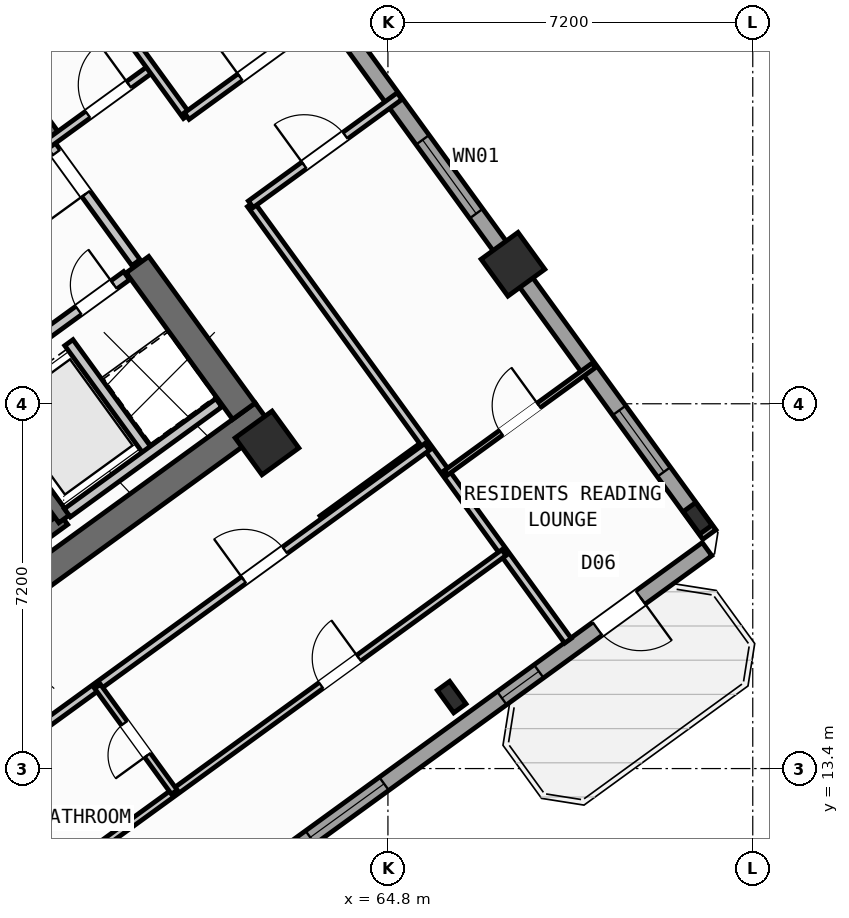
"""IFC4 building model, lengths in metres.
Left out: names, types, materials, properties, quantities, classifications, styles, units other than length and angle.
Written with IfcOpenShell. Run it as: python <this file> out.ifc"""

import sys

from ifc_helpers import new_model, si_unit, direction, frame, frame_2d, origin, origin_2d, place, context, subcontext, project, spatial, rectangle, hollow_rectangle, i_section, extrude, source, transform, mapped, element, fill, save


model = new_model("IFC4")
c1 = context("Model", 3, precision=1e-05, world=origin(), true_north=direction((0.0, 1.0)))
c2 = subcontext(c1, "Body", "Model", "MODEL_VIEW")
j1 = project(units=[si_unit("LENGTHUNIT", "METRE"), si_unit("PLANEANGLEUNIT", "RADIAN")], contexts=[c1])
p1 = place(None, origin())
s1 = spatial("IfcSite", under=j1, at=p1, CompositionType="ELEMENT")
p2 = place(p1, origin())
s2 = spatial("IfcBuilding", under=s1, at=p2, CompositionType="ELEMENT")
p3 = place(p2, frame((0.0, 0.0, 140.7)))
s3 = spatial("IfcBuildingStorey", under=s2, at=p3, CompositionType="ELEMENT", Elevation=140.7)
p4 = place(p3, frame((52.359, 13.14, 0.0), z_axis=(0.0, 0.0, 1.0), x_axis=(0.809014896919, 0.587788139183, 0.0)))
e1 = element("IfcWall", 1, at=p4, inside=s3, PredefinedType="SHEAR", context=c2, shape_type="SweptSolid", body=[
    extrude(rectangle(XDim=12.34, YDim=0.55, at=frame_2d((6.17, 0.0))), origin(), (0.0, 0.0, 1.0), 3.35),
])
p5 = place(p3, frame((61.958, 20.454, 0.0), z_axis=(0.0, 0.0, 1.0), x_axis=(-0.587802113096, 0.809004744015, 0.0)))
e2 = element("IfcWall", 2, at=p5, inside=s3, PredefinedType="SHEAR", context=c2, shape_type="SweptSolid", body=[
    extrude(rectangle(XDim=3.575, YDim=0.55, at=frame_2d((1.788, 0.0))), origin(), (0.0, 0.0, 1.0), 3.35),
])
p6 = place(p3, frame((58.064, 25.813, 0.0), z_axis=(0.0, 0.0, 1.0), x_axis=(-0.587764933797, 0.809031756236, 0.0)))
e3 = element("IfcWall", 3, at=p6, inside=s3, PredefinedType="SHEAR", context=c2, shape_type="SweptSolid", body=[
    extrude(rectangle(XDim=6.425, YDim=0.55, at=frame_2d((3.212, 0.0))), origin(), (0.0, 0.0, 1.0), 3.35),
])
m1 = source(origin(), c2, "Body", "SweptSolid", [
    extrude(i_section(OverallWidth=0.3, OverallDepth=0.55, WebThickness=0.015, FlangeThickness=0.029, at=origin_2d()), origin(), (0.0, 0.0, 1.0), 3.6),
])
p7 = place(p3, frame((66.058, 14.811, 0.0), z_axis=(0.0, 0.0, 1.0), x_axis=(0.809016994375, 0.587785252292, 0.0)))
e4 = element("IfcColumn", 4, at=p7, inside=s3, PredefinedType="COLUMN", context=c2, shape_type="MappedRepresentation", body=[
    mapped(m1, transform((0.0, 0.0, 0.0), scale=1.0)),
])
m2 = source(origin(), c2, "Body", "SweptSolid", [
    extrude(hollow_rectangle(XDim=0.9, YDim=0.9, WallThickness=0.036, at=origin_2d()), origin(), (0.0, 0.0, 1.0), 3.6),
])
p8 = place(p3, frame((62.414, 19.827, 0.0), z_axis=(0.0, 0.0, 1.0), x_axis=(0.809016994375, 0.587785252292, 0.0)))
e5 = element("IfcColumn", 5, at=p8, inside=s3, PredefinedType="COLUMN", context=c2, shape_type="MappedRepresentation", body=[
    mapped(m2, transform((0.0, 0.0, 0.0), scale=1.0)),
])
p9 = place(p3, frame((70.912, 18.338, 0.0), z_axis=(0.0, 0.0, 1.0), x_axis=(0.809016994375, 0.587785252292, 0.0)))
e6 = element("IfcColumn", 6, at=p9, inside=s3, PredefinedType="COLUMN", context=c2, shape_type="MappedRepresentation", body=[
    mapped(m1, transform((0.0, 0.0, 0.0), scale=1.0)),
])
p10 = place(p3, frame((67.268, 23.354, 0.0), z_axis=(0.0, 0.0, 1.0), x_axis=(0.809016994375, 0.587785252292, 0.0)))
e7 = element("IfcColumn", 7, at=p10, inside=s3, PredefinedType="COLUMN", context=c2, shape_type="MappedRepresentation", body=[
    mapped(m2, transform((0.0, 0.0, 0.0), scale=1.0)),
])
p11 = place(p3, frame((43.938, 25.192, 0.0), z_axis=(0.0, 0.0, 1.0), x_axis=(0.809016324578, 0.587786174187, 0.0)))
e8 = element("IfcWall", 8, at=p11, inside=s3, PredefinedType="STANDARD", context=c2, shape_type="SweptSolid", body=[
    extrude(rectangle(XDim=17.587, YDim=0.32, at=frame_2d((8.794, 0.0))), origin(), (0.0, 0.0, 1.0), 3.35),
])
p12 = place(p11, frame((14.914, 0.0, 0.0)))
e9 = element("IfcOpeningElement", 9, at=p12, cuts=e8, PredefinedType="OPENING", context=c2, shape_type="SweptSolid", body=[
    extrude(rectangle(XDim=1.05, YDim=2.15, at=frame_2d((0.525, 1.075))), frame((0.0, 0.17, 0.0), z_axis=(0.0, -1.0, 0.0), x_axis=(1.0, 0.0, 0.0)), (0.0, 0.0, 1.0), 0.34),
])
p13 = place(p11, frame((2.144, 0.0, 0.8)))
e10 = element("IfcOpeningElement", 10, at=p13, cuts=e8, PredefinedType="OPENING", context=c2, shape_type="SweptSolid", body=[
    extrude(rectangle(XDim=2.1, YDim=1.55, at=frame_2d((1.05, 0.775))), frame((0.0, 0.17, 0.0), z_axis=(0.0, -1.0, 0.0), x_axis=(1.0, 0.0, 0.0)), (0.0, 0.0, 1.0), 0.34),
])
p14 = place(p11, frame((7.344, 0.0, 0.8)))
e11 = element("IfcOpeningElement", 11, at=p14, cuts=e8, PredefinedType="OPENING", context=c2, shape_type="SweptSolid", body=[
    extrude(rectangle(XDim=2.1, YDim=1.55, at=frame_2d((1.05, 0.775))), frame((0.0, 0.17, 0.0), z_axis=(0.0, -1.0, 0.0), x_axis=(1.0, 0.0, 0.0)), (0.0, 0.0, 1.0), 0.34),
])
p15 = place(p3, frame((58.455, 35.484, 0.0), z_axis=(0.0, 0.0, 1.0), x_axis=(0.587783625747, -0.809018176127, 0.0)))
e12 = element("IfcWall", 12, at=p15, inside=s3, PredefinedType="STANDARD", context=c2, shape_type="SweptSolid", body=[
    extrude(rectangle(XDim=21.587, YDim=0.32, at=frame_2d((10.794, 0.0))), origin(), (0.0, 0.0, 1.0), 2.775),
])
p16 = place(p15, frame((2.994, 0.0, 0.8)))
e13 = element("IfcOpeningElement", 13, at=p16, cuts=e12, PredefinedType="OPENING", context=c2, shape_type="SweptSolid", body=[
    extrude(rectangle(XDim=2.1, YDim=1.55, at=frame_2d((1.05, 0.775))), frame((0.0, 0.17, 0.0), z_axis=(0.0, -1.0, 0.0), x_axis=(1.0, 0.0, 0.0)), (0.0, 0.0, 1.0), 0.34),
])
p17 = place(p15, frame((11.959, 0.0, 0.85)))
e14 = element("IfcOpeningElement", 14, at=p17, cuts=e12, PredefinedType="OPENING", context=c2, shape_type="SweptSolid", body=[
    extrude(rectangle(XDim=1.8, YDim=1.5, at=frame_2d((0.9, 0.75))), frame((0.0, 0.17, 0.0), z_axis=(0.0, -1.0, 0.0), x_axis=(1.0, 0.0, 0.0)), (0.0, 0.0, 1.0), 0.34),
])
p18 = place(p15, frame((18.56, 0.0, 0.85)))
e15 = element("IfcOpeningElement", 15, at=p18, cuts=e12, PredefinedType="OPENING", context=c2, shape_type="SweptSolid", body=[
    extrude(rectangle(XDim=1.5, YDim=1.5, at=frame_2d((0.75, 0.75))), frame((0.0, 0.17, 0.0), z_axis=(0.0, -1.0, 0.0), x_axis=(1.0, 0.0, 0.0)), (0.0, 0.0, 1.0), 0.34),
])
p19 = place(p3, frame((71.098, 17.731, 0.0), z_axis=(0.0, 0.0, 1.0), x_axis=(-0.809021120468, -0.587779573171, 0.0)))
e16 = element("IfcWall", 16, at=p19, inside=s3, PredefinedType="STANDARD", context=c2, shape_type="SweptSolid", body=[
    extrude(rectangle(XDim=17.588, YDim=0.32, at=frame_2d((8.794, 0.0))), origin(), (0.0, 0.0, 1.0), 3.35),
])
p20 = place(p19, frame((1.624, 0.0, 0.0)))
e17 = element("IfcOpeningElement", 17, at=p20, cuts=e16, PredefinedType="OPENING", context=c2, shape_type="SweptSolid", body=[
    extrude(rectangle(XDim=1.05, YDim=2.15, at=frame_2d((0.525, 1.075))), frame((0.0, 0.17, 0.0), z_axis=(0.0, -1.0, 0.0), x_axis=(1.0, 0.0, 0.0)), (0.0, 0.0, 1.0), 0.34),
])
p21 = place(p19, frame((4.104, 0.0, 1.0)))
e18 = element("IfcOpeningElement", 18, at=p21, cuts=e16, PredefinedType="OPENING", context=c2, shape_type="SweptSolid", body=[
    extrude(rectangle(XDim=0.9, YDim=1.25, at=frame_2d((0.45, 0.625))), frame((0.0, 0.17, 0.0), z_axis=(0.0, -1.0, 0.0), x_axis=(1.0, 0.0, 0.0)), (0.0, 0.0, 1.0), 0.34),
])
p22 = place(p19, frame((7.879, 0.0, 0.85)))
e19 = element("IfcOpeningElement", 19, at=p22, cuts=e16, PredefinedType="OPENING", context=c2, shape_type="SweptSolid", body=[
    extrude(rectangle(XDim=1.8, YDim=1.5, at=frame_2d((0.9, 0.75))), frame((0.0, 0.17, 0.0), z_axis=(0.0, -1.0, 0.0), x_axis=(1.0, 0.0, 0.0)), (0.0, 0.0, 1.0), 0.34),
])
p23 = place(p19, frame((12.849, 0.0, 0.85)))
e20 = element("IfcOpeningElement", 20, at=p23, cuts=e16, PredefinedType="OPENING", context=c2, shape_type="SweptSolid", body=[
    extrude(rectangle(XDim=1.8, YDim=1.5, at=frame_2d((0.9, 0.75))), frame((0.0, 0.17, 0.0), z_axis=(0.0, -1.0, 0.0), x_axis=(1.0, 0.0, 0.0)), (0.0, 0.0, 1.0), 0.34),
])
p24 = place(p3, frame((52.472, 14.013, 0.0), z_axis=(0.0, 0.0, 1.0), x_axis=(0.809028366311, 0.587769599847, 0.0)))
e21 = element("IfcWall", 21, at=p24, inside=s3, PredefinedType="SHEAR", context=c2, shape_type="SweptSolid", body=[
    extrude(rectangle(XDim=7.33, YDim=0.26, at=frame_2d((3.665, 0.0))), origin(), (0.0, 0.0, 1.0), 3.35),
])
p25 = place(p3, frame((58.41, 18.327, 0.0), z_axis=(0.0, 0.0, 1.0), x_axis=(-0.58776738483, 0.809029975545, 0.0)))
e22 = element("IfcWall", 22, at=p25, inside=s3, PredefinedType="SHEAR", context=c2, shape_type="SweptSolid", body=[
    extrude(rectangle(XDim=3.16, YDim=0.26, at=frame_2d((1.58, 0.0))), origin(), (0.0, 0.0, 1.0), 3.35),
])
p26 = place(p3, frame((56.553, 20.884, 0.0), z_axis=(0.0, 0.0, 1.0), x_axis=(0.809023564264, 0.58777620951, 0.0)))
e23 = element("IfcWall", 23, at=p26, inside=s3, PredefinedType="STANDARD", context=c2, shape_type="SweptSolid", body=[
    extrude(rectangle(XDim=3.818, YDim=0.2, at=frame_2d((1.909, 0.0))), origin(), (0.0, 0.0, 1.0), 3.34),
])
p27 = place(p26, frame((0.57, 0.0, 0.0)))
e24 = element("IfcOpeningElement", 24, at=p27, cuts=e23, PredefinedType="OPENING", context=c2, shape_type="SweptSolid", body=[
    extrude(rectangle(XDim=1.1, YDim=2.15, at=frame_2d((0.55, 1.075))), frame((0.0, 0.11, 0.0), z_axis=(0.0, -1.0, 0.0), x_axis=(1.0, 0.0, 0.0)), (0.0, 0.0, 1.0), 0.22),
])
p28 = place(p26, frame((2.65, 0.0, 0.0)))
e25 = element("IfcOpeningElement", 25, at=p28, cuts=e23, PredefinedType="OPENING", context=c2, shape_type="SweptSolid", body=[
    extrude(rectangle(XDim=0.86, YDim=2.05, at=frame_2d((0.43, 1.025))), frame((0.0, 0.11, 0.0), z_axis=(0.0, -1.0, 0.0), x_axis=(1.0, 0.0, 0.0)), (0.0, 0.0, 1.0), 0.22),
])
p29 = place(p3, frame((60.067, 19.655, 0.0), z_axis=(0.0, 0.0, 1.0), x_axis=(-0.587800520745, 0.809005900975, 0.0)))
e26 = element("IfcWall", 26, at=p29, inside=s3, PredefinedType="STANDARD", context=c2, shape_type="SweptSolid", body=[
    extrude(rectangle(XDim=2.66, YDim=0.2, at=frame_2d((1.33, 0.0))), origin(), (0.0, 0.0, 1.0), 3.34),
])
p30 = place(p3, frame((58.472, 18.447, 0.0), z_axis=(0.0, 0.0, 1.0), x_axis=(0.809018631237, 0.587782999339, 0.0)))
e27 = element("IfcWall", 27, at=p30, inside=s3, PredefinedType="STANDARD", context=c2, shape_type="SweptSolid", body=[
    extrude(rectangle(XDim=3.698, YDim=0.2, at=frame_2d((1.849, 0.0))), origin(), (0.0, 0.0, 1.0), 3.34),
])
p31 = place(p3, frame((59.827, 23.386, 0.0), z_axis=(0.0, 0.0, 1.0), x_axis=(-0.587803840107, 0.809003489211, 0.0)))
e28 = element("IfcWall", 28, at=p31, inside=s3, PredefinedType="STANDARD", context=c2, shape_type="SweptSolid", body=[
    extrude(rectangle(XDim=2.96, YDim=0.2, at=frame_2d((1.48, 0.0))), origin(), (0.0, 0.0, 1.0), 3.34),
])
p32 = place(p31, frame((1.68, 0.0, 0.0)))
e29 = element("IfcOpeningElement", 29, at=p32, cuts=e28, PredefinedType="OPENING", context=c2, shape_type="SweptSolid", body=[
    extrude(rectangle(XDim=1.0, YDim=2.1, at=frame_2d((0.5, 1.05))), frame((0.0, 0.11, 0.0), z_axis=(0.0, -1.0, 0.0), x_axis=(1.0, 0.0, 0.0)), (0.0, 0.0, 1.0), 0.22),
])
p33 = place(p3, frame((63.507, 18.322, 0.0), z_axis=(0.0, 0.0, 1.0), x_axis=(0.809034604122, 0.587761013791, 0.0)))
e30 = element("IfcWall", 30, at=p33, inside=s3, PredefinedType="PARTITIONING", context=c2, shape_type="SweptSolid", body=[
    extrude(rectangle(XDim=2.51, YDim=0.16, at=frame_2d((1.255, 0.0))), origin(), (0.0, 0.0, 1.0), 3.34),
])
p34 = place(p3, frame((58.111, 25.749, 0.0), z_axis=(0.0, 0.0, 1.0), x_axis=(0.809000999347, 0.58780726693, 0.0)))
e31 = element("IfcWall", 31, at=p34, inside=s3, PredefinedType="PARTITIONING", context=c2, shape_type="SweptSolid", body=[
    extrude(rectangle(XDim=2.51, YDim=0.16, at=frame_2d((1.255, 0.0))), origin(), (0.0, 0.0, 1.0), 2.775),
])
p35 = place(p34, frame((0.95, 0.0, 0.0)))
e32 = element("IfcOpeningElement", 32, at=p35, cuts=e31, PredefinedType="OPENING", context=c2, shape_type="SweptSolid", body=[
    extrude(rectangle(XDim=1.0, YDim=2.1, at=frame_2d((0.5, 1.05))), frame((0.0, 0.09, 0.0), z_axis=(0.0, -1.0, 0.0), x_axis=(1.0, 0.0, 0.0)), (0.0, 0.0, 1.0), 0.18),
])
p36 = place(p3, frame((68.353, 15.922, 0.0), z_axis=(0.0, 0.0, 1.0), x_axis=(-0.587783168305, 0.809018508476, 0.0)))
e33 = element("IfcWall", 33, at=p36, inside=s3, PredefinedType="PARTITIONING", context=c2, shape_type="SweptSolid", body=[
    extrude(rectangle(XDim=10.65, YDim=0.16, at=frame_2d((5.325, 0.0))), origin(), (0.0, 0.0, 1.0), 3.34),
])
p37 = place(p3, frame((60.829, 26.278, 0.0), z_axis=(0.0, 0.0, 1.0), x_axis=(-0.587781800813, 0.80901950201, 0.0)))
e34 = element("IfcWall", 34, at=p37, inside=s3, PredefinedType="PARTITIONING", context=c2, shape_type="SweptSolid", body=[
    extrude(rectangle(XDim=8.9, YDim=0.16, at=frame_2d((4.45, 0.0))), origin(), (0.0, 0.0, 1.0), 3.34),
])
p38 = place(p3, frame((62.093, 24.538, 0.0), z_axis=(0.0, 0.0, 1.0), x_axis=(0.809035546126, 0.58775971715, 0.0)))
e35 = element("IfcWall", 35, at=p38, inside=s3, PredefinedType="PARTITIONING", context=c2, shape_type="SweptSolid", body=[
    extrude(rectangle(XDim=3.63, YDim=0.16, at=frame_2d((1.815, 0.0))), origin(), (0.0, 0.0, 1.0), 3.34),
])
p39 = place(p38, frame((1.305, 0.0, 0.0)))
e36 = element("IfcOpeningElement", 36, at=p39, cuts=e35, PredefinedType="OPENING", context=c2, shape_type="SweptSolid", body=[
    extrude(rectangle(XDim=1.0, YDim=2.1, at=frame_2d((0.5, 1.05))), frame((0.0, 0.09, 0.0), z_axis=(0.0, -1.0, 0.0), x_axis=(1.0, 0.0, 0.0)), (0.0, 0.0, 1.0), 0.18),
])
p40 = place(p3, frame((60.829, 26.278, 0.0), z_axis=(0.0, 0.0, 1.0), x_axis=(0.809003564202, 0.587803736896, 0.0)))
e37 = element("IfcWall", 37, at=p40, inside=s3, PredefinedType="PARTITIONING", context=c2, shape_type="SweptSolid", body=[
    extrude(rectangle(XDim=3.63, YDim=0.16, at=frame_2d((1.815, 0.0))), origin(), (0.0, 0.0, 1.0), 3.34),
])
p41 = place(p40, frame((1.305, 0.0, 0.0)))
e38 = element("IfcOpeningElement", 38, at=p41, cuts=e37, PredefinedType="OPENING", context=c2, shape_type="SweptSolid", body=[
    extrude(rectangle(XDim=1.0, YDim=2.1, at=frame_2d((0.5, 1.05))), frame((0.0, 0.09, 0.0), z_axis=(0.0, -1.0, 0.0), x_axis=(1.0, 0.0, 0.0)), (0.0, 0.0, 1.0), 0.18),
])
p42 = place(p3, frame((65.944, 19.238, 0.0), z_axis=(0.0, 0.0, 1.0), x_axis=(0.809013833588, 0.587789602718, 0.0)))
e39 = element("IfcWall", 39, at=p42, inside=s3, PredefinedType="PARTITIONING", context=c2, shape_type="SweptSolid", body=[
    extrude(rectangle(XDim=3.61, YDim=0.11, at=frame_2d((1.805, 0.0))), origin(), (0.0, 0.0, 1.0), 3.34),
])
p43 = place(p42, frame((1.345, 0.0, 0.0)))
e40 = element("IfcOpeningElement", 40, at=p43, cuts=e39, PredefinedType="OPENING", context=c2, shape_type="SweptSolid", body=[
    extrude(rectangle(XDim=0.92, YDim=2.08, at=frame_2d((0.46, 1.04))), frame((0.0, 0.065, 0.0), z_axis=(0.0, -1.0, 0.0), x_axis=(1.0, 0.0, 0.0)), (0.0, 0.0, 1.0), 0.13),
])
p44 = place(p3, frame((53.705, 11.126, 0.0), z_axis=(0.0, 0.0, 1.0), x_axis=(0.809014504436, 0.587788679384, 0.0)))
e41 = element("IfcWall", 41, at=p44, inside=s3, PredefinedType="PARTITIONING", context=c2, shape_type="SweptSolid", body=[
    extrude(rectangle(XDim=14.67, YDim=0.16, at=frame_2d((7.335, 0.0))), origin(), (0.0, 0.0, 1.0), 3.34),
])
p45 = place(p44, frame((10.2, 0.0, 0.0)))
e42 = element("IfcOpeningElement", 42, at=p45, cuts=e41, PredefinedType="OPENING", context=c2, shape_type="SweptSolid", body=[
    extrude(rectangle(XDim=1.0, YDim=2.1, at=frame_2d((0.5, 1.05))), frame((0.0, 0.09, 0.0), z_axis=(0.0, -1.0, 0.0), x_axis=(1.0, 0.0, 0.0)), (0.0, 0.0, 1.0), 0.18),
])
p46 = place(p3, frame((56.249, 9.785, 0.0), z_axis=(0.0, 0.0, 1.0), x_axis=(0.809011747655, 0.587792473715, 0.0)))
e43 = element("IfcWall", 43, at=p46, inside=s3, PredefinedType="PLUMBINGWALL", context=c2, shape_type="SweptSolid", body=[
    extrude(rectangle(XDim=13.4, YDim=0.14, at=frame_2d((6.7, 0.0))), origin(), (0.0, 0.0, 1.0), 3.34),
])
p47 = place(p46, frame((8.94, 0.0, 0.0)))
e44 = element("IfcOpeningElement", 44, at=p47, cuts=e43, PredefinedType="OPENING", context=c2, shape_type="SweptSolid", body=[
    extrude(rectangle(XDim=0.92, YDim=2.08, at=frame_2d((0.46, 1.04))), frame((0.0, 0.08, 0.0), z_axis=(0.0, -1.0, 0.0), x_axis=(1.0, 0.0, 0.0)), (0.0, 0.0, 1.0), 0.16),
])
p48 = place(p3, frame((60.585, 12.936, 0.0), z_axis=(0.0, 0.0, 1.0), x_axis=(-0.587772116736, 0.809026537752, 0.0)))
e45 = element("IfcWall", 45, at=p48, inside=s3, PredefinedType="PLUMBINGWALL", context=c2, shape_type="SweptSolid", body=[
    extrude(rectangle(XDim=2.58, YDim=0.14, at=frame_2d((1.29, 0.0))), origin(), (0.0, 0.0, 1.0), 3.34),
])
p49 = place(p48, frame((0.9, 0.0, 0.0)))
e46 = element("IfcOpeningElement", 46, at=p49, cuts=e45, PredefinedType="OPENING", context=c2, shape_type="SweptSolid", body=[
    extrude(rectangle(XDim=0.78, YDim=2.05, at=frame_2d((0.39, 1.025))), frame((0.0, 0.08, 0.0), z_axis=(0.0, -1.0, 0.0), x_axis=(1.0, 0.0, 0.0)), (0.0, 0.0, 1.0), 0.16),
])
m3 = source(origin(), c2, "Body", "SweptSolid", [
    extrude(rectangle(XDim=1.05, YDim=2.15, at=frame_2d((0.525, 1.075))), frame((0.0, 0.025, 0.0), z_axis=(0.0, -1.0, 0.0), x_axis=(1.0, 0.0, 0.0)), (0.0, 0.0, 1.0), 0.05),
])
p50 = place(p20, origin())
e47 = element("IfcDoor", 47, at=p50, inside=s3, OperationType="SINGLE_SWING_LEFT", PredefinedType="DOOR", context=c2, shape_type="MappedRepresentation", body=[
    mapped(m3, transform((0.0, 0.0, 0.0), scale=1.0)),
])
fill(e17, e47)
m4 = source(origin(), c2, "Body", "SweptSolid", [
    extrude(rectangle(XDim=1.8, YDim=1.5, at=frame_2d((0.9, 0.75))), frame((0.0, 0.03, 0.0), z_axis=(0.0, -1.0, 0.0), x_axis=(1.0, 0.0, 0.0)), (0.0, 0.0, 1.0), 0.06),
])
p51 = place(p17, origin())
e48 = element("IfcWindow", 48, at=p51, inside=s3, PartitioningType="SINGLE_PANEL", PredefinedType="WINDOW", context=c2, shape_type="MappedRepresentation", body=[
    mapped(m4, transform((0.0, 0.0, 0.0), scale=1.0)),
])
fill(e14, e48)
m5 = source(origin(), c2, "Body", "SweptSolid", [
    extrude(rectangle(XDim=1.5, YDim=1.5, at=frame_2d((0.75, 0.75))), frame((0.0, 0.03, 0.0), z_axis=(0.0, -1.0, 0.0), x_axis=(1.0, 0.0, 0.0)), (0.0, 0.0, 1.0), 0.06),
])
p52 = place(p18, origin())
e49 = element("IfcWindow", 49, at=p52, inside=s3, PartitioningType="SINGLE_PANEL", PredefinedType="WINDOW", context=c2, shape_type="MappedRepresentation", body=[
    mapped(m5, transform((0.0, 0.0, 0.0), scale=1.0)),
])
fill(e15, e49)
m6 = source(origin(), c2, "Body", "SweptSolid", [
    extrude(rectangle(XDim=0.9, YDim=1.25, at=frame_2d((0.45, 0.625))), frame((0.0, 0.03, 0.0), z_axis=(0.0, -1.0, 0.0), x_axis=(1.0, 0.0, 0.0)), (0.0, 0.0, 1.0), 0.06),
])
p53 = place(p21, origin())
e50 = element("IfcWindow", 50, at=p53, inside=s3, PartitioningType="SINGLE_PANEL", PredefinedType="WINDOW", context=c2, shape_type="MappedRepresentation", body=[
    mapped(m6, transform((0.0, 0.0, 0.0), scale=1.0)),
])
fill(e18, e50)
p54 = place(p22, origin())
e51 = element("IfcWindow", 51, at=p54, inside=s3, PartitioningType="SINGLE_PANEL", PredefinedType="WINDOW", context=c2, shape_type="MappedRepresentation", body=[
    mapped(m4, transform((0.0, 0.0, 0.0), scale=1.0)),
])
fill(e19, e51)
m7 = source(origin(), c2, "Body", "SweptSolid", [
    extrude(rectangle(XDim=0.86, YDim=2.05, at=frame_2d((0.43, 1.025))), frame((0.0, 0.025, 0.0), z_axis=(0.0, -1.0, 0.0), x_axis=(1.0, 0.0, 0.0)), (0.0, 0.0, 1.0), 0.05),
])
p55 = place(p28, origin())
e52 = element("IfcDoor", 52, at=p55, inside=s3, OperationType="SINGLE_SWING_RIGHT", PredefinedType="DOOR", context=c2, shape_type="MappedRepresentation", body=[
    mapped(m7, transform((0.0, 0.0, 0.0), scale=1.0)),
])
fill(e25, e52)
m8 = source(origin(), c2, "Body", "SweptSolid", [
    extrude(rectangle(XDim=1.0, YDim=2.1, at=frame_2d((0.5, 1.05))), frame((0.0, 0.025, 0.0), z_axis=(0.0, -1.0, 0.0), x_axis=(1.0, 0.0, 0.0)), (0.0, 0.0, 1.0), 0.05),
])
p56 = place(p35, origin())
e53 = element("IfcDoor", 53, at=p56, inside=s3, OperationType="SINGLE_SWING_RIGHT", PredefinedType="DOOR", context=c2, shape_type="MappedRepresentation", body=[
    mapped(m8, transform((0.0, 0.0, 0.0), scale=1.0)),
])
fill(e32, e53)
p57 = place(p32, origin())
e54 = element("IfcDoor", 54, at=p57, inside=s3, OperationType="SINGLE_SWING_LEFT", PredefinedType="DOOR", context=c2, shape_type="MappedRepresentation", body=[
    mapped(m8, transform((0.0, 0.0, 0.0), scale=1.0)),
])
fill(e29, e54)
p58 = place(p41, origin())
e55 = element("IfcDoor", 55, at=p58, inside=s3, OperationType="SINGLE_SWING_LEFT", PredefinedType="DOOR", context=c2, shape_type="MappedRepresentation", body=[
    mapped(m8, transform((0.0, 0.0, 0.0), scale=1.0)),
])
fill(e38, e55)
p59 = place(p39, origin())
e56 = element("IfcDoor", 56, at=p59, inside=s3, OperationType="SINGLE_SWING_LEFT", PredefinedType="DOOR", context=c2, shape_type="MappedRepresentation", body=[
    mapped(m8, transform((0.0, 0.0, 0.0), scale=1.0)),
])
fill(e36, e56)
m9 = source(origin(), c2, "Body", "SweptSolid", [
    extrude(rectangle(XDim=0.92, YDim=2.08, at=frame_2d((0.46, 1.04))), frame((0.0, 0.025, 0.0), z_axis=(0.0, -1.0, 0.0), x_axis=(1.0, 0.0, 0.0)), (0.0, 0.0, 1.0), 0.05),
])
p60 = place(p43, origin())
e57 = element("IfcDoor", 57, at=p60, inside=s3, OperationType="SINGLE_SWING_RIGHT", PredefinedType="DOOR", context=c2, shape_type="MappedRepresentation", body=[
    mapped(m9, transform((0.0, 0.0, 0.0), scale=1.0)),
])
fill(e40, e57)
p61 = place(p45, origin())
e58 = element("IfcDoor", 58, at=p61, inside=s3, OperationType="SINGLE_SWING_LEFT", PredefinedType="DOOR", context=c2, shape_type="MappedRepresentation", body=[
    mapped(m8, transform((0.0, 0.0, 0.0), scale=1.0)),
])
fill(e42, e58)
p62 = place(p47, origin())
e59 = element("IfcDoor", 59, at=p62, inside=s3, OperationType="SINGLE_SWING_RIGHT", PredefinedType="DOOR", context=c2, shape_type="MappedRepresentation", body=[
    mapped(m9, transform((0.0, 0.0, 0.0), scale=1.0)),
])
fill(e44, e59)
m10 = source(origin(), c2, "Body", "SweptSolid", [
    extrude(rectangle(XDim=0.78, YDim=2.05, at=frame_2d((0.39, 1.025))), frame((0.0, 0.025, 0.0), z_axis=(0.0, -1.0, 0.0), x_axis=(1.0, 0.0, 0.0)), (0.0, 0.0, 1.0), 0.05),
])
p63 = place(p49, origin())
e60 = element("IfcDoor", 60, at=p63, inside=s3, OperationType="SINGLE_SWING_LEFT", PredefinedType="DOOR", context=c2, shape_type="MappedRepresentation", body=[
    mapped(m10, transform((0.0, 0.0, 0.0), scale=1.0)),
])
fill(e46, e60)
save(model, sys.argv[1])
